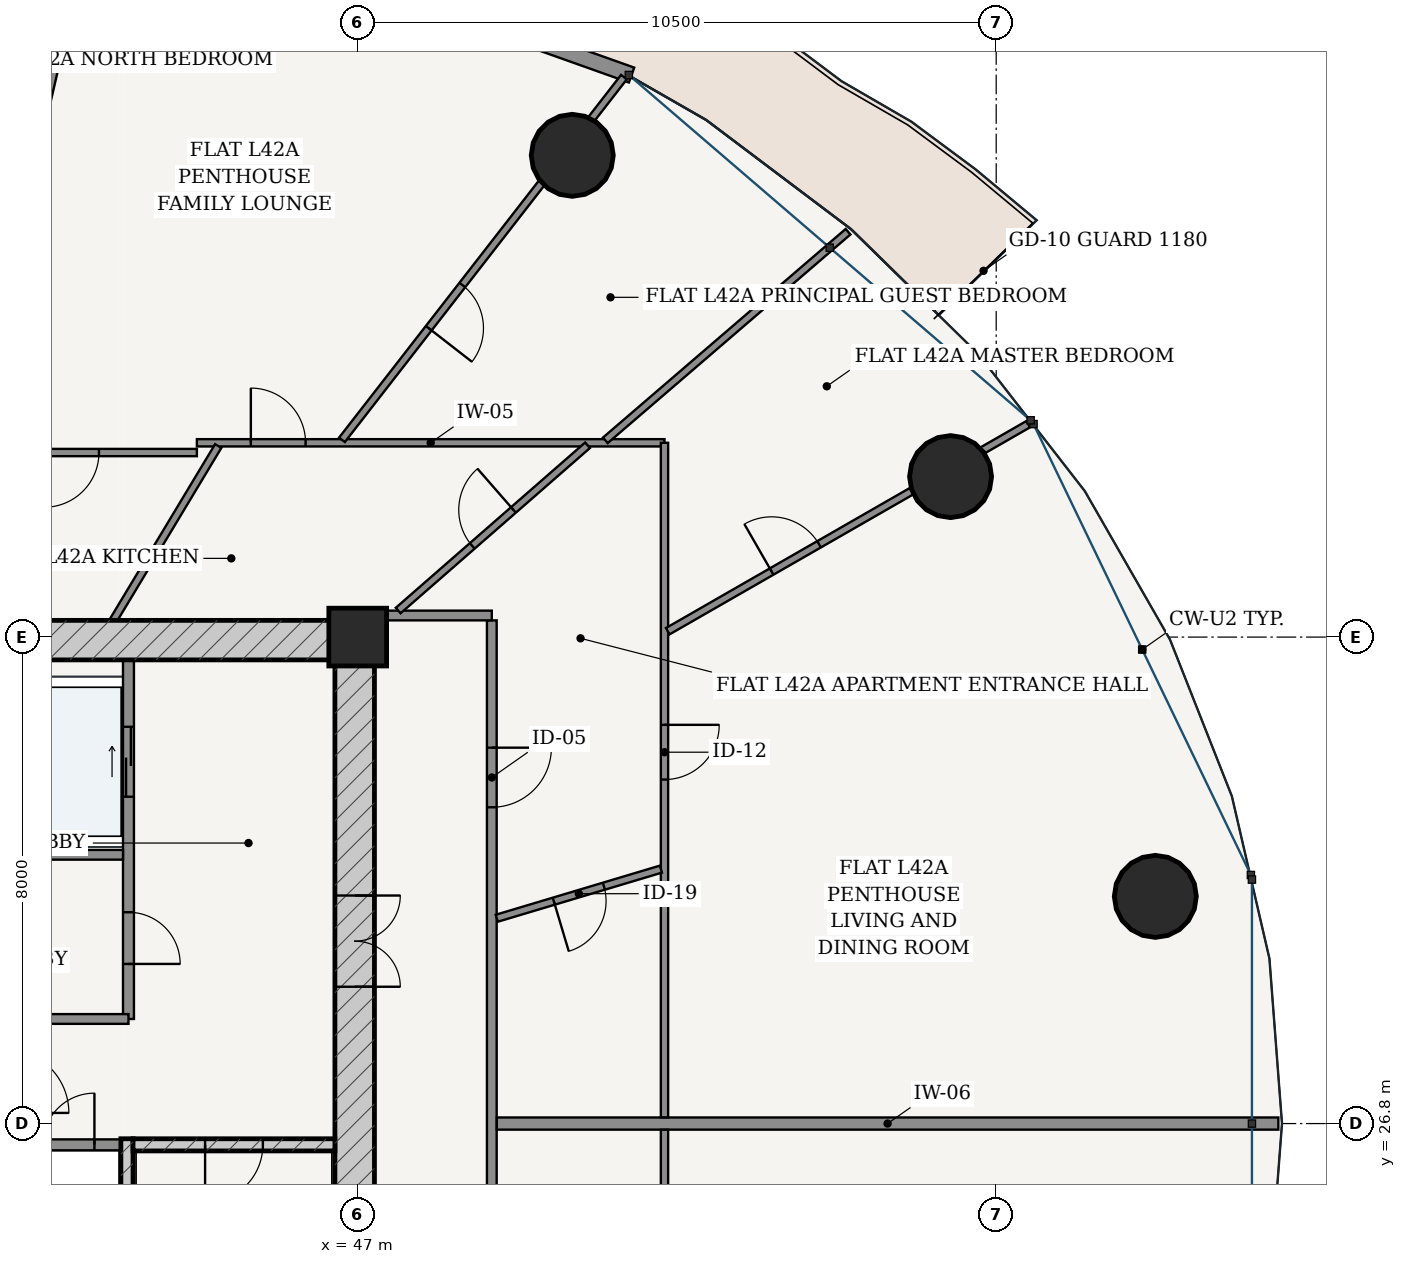
"""IFC4 building model, lengths in metres.
Left out: names, types, materials, properties, quantities, classifications, styles, units other than length and angle.
Written with IfcOpenShell. Run it as: python <this file> out.ifc"""

import sys

from ifc_helpers import new_model, si_unit, direction, frame, frame_2d, origin, origin_2d, place, context, subcontext, project, spatial, rectangle, hollow_circle, extrude, source, transform, mapped, element, fill, save


model = new_model("IFC4")
c1 = context("Model", 3, precision=1e-05, world=origin(), true_north=direction((-0.2419218956, 0.970295726276)))
c2 = subcontext(c1, "Body", "Model", "MODEL_VIEW")
j1 = project(units=[si_unit("LENGTHUNIT", "METRE"), si_unit("PLANEANGLEUNIT", "RADIAN")], contexts=[c1])
p1 = place(None, origin())
s1 = spatial("IfcSite", under=j1, at=p1, CompositionType="ELEMENT")
p2 = place(p1, origin())
s2 = spatial("IfcBuilding", under=s1, at=p2, CompositionType="ELEMENT")
p3 = place(p2, frame((0.0, 0.0, 160.6)))
s3 = spatial("IfcBuildingStorey", under=s2, at=p3, CompositionType="ELEMENT", Elevation=160.6)
p4 = place(p3, frame((47.0, 34.8, 0.0), z_axis=(0.0, 0.0, 1.0), x_axis=(1.0, 0.0, 0.0)))
e1 = element("IfcColumn", 1, at=p4, inside=s3, PredefinedType="COLUMN", context=c2, shape_type="SweptSolid", body=[
    extrude(rectangle(XDim=0.95, YDim=0.95, at=origin_2d()), origin(), (0.0, 0.0, 1.0), 3.6),
])
p5 = place(p3, frame((28.725, 34.75, 0.0), z_axis=(0.0, 0.0, 1.0), x_axis=(1.0, 0.0, 0.0)))
e2 = element("IfcWall", 2, at=p5, inside=s3, PredefinedType="SHEAR", context=c2, shape_type="SweptSolid", body=[
    extrude(rectangle(XDim=18.55, YDim=0.65, at=frame_2d((9.275, 0.0))), origin(), (0.0, 0.0, 1.0), 3.33),
])
p6 = place(p3, frame((46.95, 19.175, 0.0), z_axis=(0.0, 0.0, 1.0), x_axis=(0.0, 1.0, 0.0)))
e3 = element("IfcWall", 3, at=p6, inside=s3, PredefinedType="SHEAR", context=c2, shape_type="SweptSolid", body=[
    extrude(rectangle(XDim=15.25, YDim=0.65, at=frame_2d((7.625, 0.0))), origin(), (0.0, 0.0, 1.0), 3.33),
])
p7 = place(p6, frame((9.875, 0.0, 0.0)))
e4 = element("IfcOpeningElement", 4, at=p7, cuts=e3, PredefinedType="OPENING", context=c2, shape_type="SweptSolid", body=[
    extrude(rectangle(XDim=1.5, YDim=2.2, at=frame_2d((0.75, 1.1))), frame((0.0, 0.335, 0.0), z_axis=(0.0, -1.0, 0.0), x_axis=(1.0, 0.0, 0.0)), (0.0, 0.0, 1.0), 0.67),
])
p8 = place(p3, frame((43.205, 19.175, 0.0), z_axis=(0.0, 0.0, 1.0), x_axis=(0.0, 1.0, 0.0)))
e5 = element("IfcWall", 5, at=p8, inside=s3, PredefinedType="SOLIDWALL", context=c2, shape_type="SweptSolid", body=[
    extrude(rectangle(XDim=7.375, YDim=0.2, at=frame_2d((3.688, 0.0))), origin(), (0.0, 0.0, 1.0), 3.33),
])
p9 = place(p3, frame((43.305, 26.45, 0.0), z_axis=(0.0, 0.0, 1.0), x_axis=(1.0, 0.0, 0.0)))
e6 = element("IfcWall", 6, at=p9, inside=s3, PredefinedType="SOLIDWALL", context=c2, shape_type="SweptSolid", body=[
    extrude(rectangle(XDim=3.32, YDim=0.2, at=frame_2d((1.66, 0.0))), origin(), (0.0, 0.0, 1.0), 3.33),
])
p10 = place(p9, frame((1.185, 0.0, 0.0)))
e7 = element("IfcOpeningElement", 7, at=p10, cuts=e6, PredefinedType="OPENING", context=c2, shape_type="SweptSolid", body=[
    extrude(rectangle(XDim=0.95, YDim=2.15, at=frame_2d((0.475, 1.075))), frame((0.0, 0.11, 0.0), z_axis=(0.0, -1.0, 0.0), x_axis=(1.0, 0.0, 0.0)), (0.0, 0.0, 1.0), 0.22),
])
for number, where, z_axis, x_axis in (
    (8, (60.117, 30.536, 0.0), (0.0, 0.0, 1.0), (1.0, 0.0, 0.0)),
    (9, (56.75, 37.439, 0.0), (0.0, 0.0, 1.0), (1.0, 0.0, 0.0)),
    (10, (50.528, 42.723, 0.0), (0.0, 0.0, 1.0), (1.0, 0.0, 0.0)),
):
    element("IfcColumn", number, at=place(p3, frame(where, z_axis=z_axis, x_axis=x_axis)), inside=s3, PredefinedType="COLUMN", context=c2, shape_type="SweptSolid", body=[
        extrude(hollow_circle(Radius=0.675, WallThickness=0.042, at=origin_2d()), origin(), (0.0, 0.0, 1.0), 3.6),
    ])
p11 = place(p3, frame((51.503, 44.043, 0.0), z_axis=(0.0, 0.0, 1.0), x_axis=(-0.942095406405, 0.335344964522, 0.0)))
e11 = element("IfcWall", 11, at=p11, inside=s3, PredefinedType="SOLIDWALL", context=c2, shape_type="SweptSolid", body=[
    extrude(rectangle(XDim=9.408, YDim=0.26, at=frame_2d((4.704, 0.0))), origin(), (0.0, 0.0, 1.0), 3.33),
])
p12 = place(p11, frame((4.029, 0.0, 0.0)))
e12 = element("IfcOpeningElement", 12, at=p12, cuts=e11, PredefinedType="OPENING", context=c2, shape_type="SweptSolid", body=[
    extrude(rectangle(XDim=1.35, YDim=2.2, at=frame_2d((0.675, 1.1))), frame((0.0, 0.14, 0.0), z_axis=(0.0, -1.0, 0.0), x_axis=(1.0, 0.0, 0.0)), (0.0, 0.0, 1.0), 0.28),
])
p13 = place(p3, frame((41.39, 26.45, 0.0), z_axis=(0.0, 0.0, 1.0), x_axis=(1.0, 0.0, 0.0)))
e13 = element("IfcWall", 13, at=p13, inside=s3, PredefinedType="PARTITIONING", context=c2, shape_type="SweptSolid", body=[
    extrude(rectangle(XDim=1.71, YDim=0.18, at=frame_2d((0.855, 0.0))), origin(), (0.0, 0.0, 1.0), 3.33),
])
p14 = place(p13, frame((0.43, 0.0, 0.0)))
e14 = element("IfcOpeningElement", 14, at=p14, cuts=e13, PredefinedType="OPENING", context=c2, shape_type="SweptSolid", body=[
    extrude(rectangle(XDim=0.85, YDim=2.1, at=frame_2d((0.425, 1.05))), frame((0.0, 0.1, 0.0), z_axis=(0.0, -1.0, 0.0), x_axis=(1.0, 0.0, 0.0)), (0.0, 0.0, 1.0), 0.2),
])
p15 = place(p3, frame((43.23, 28.52, 0.0), z_axis=(0.0, 0.0, 1.0), x_axis=(0.0, 1.0, 0.0)))
e15 = element("IfcWall", 15, at=p15, inside=s3, PredefinedType="PARTITIONING", context=c2, shape_type="SweptSolid", body=[
    extrude(rectangle(XDim=5.905, YDim=0.18, at=frame_2d((2.953, 0.0))), origin(), (0.0, 0.0, 1.0), 3.33),
])
p16 = place(p15, frame((0.905, 0.0, 0.0)))
e16 = element("IfcOpeningElement", 16, at=p16, cuts=e15, PredefinedType="OPENING", context=c2, shape_type="SweptSolid", body=[
    extrude(rectangle(XDim=0.85, YDim=2.1, at=frame_2d((0.425, 1.05))), frame((0.0, 0.1, 0.0), z_axis=(0.0, -1.0, 0.0), x_axis=(1.0, 0.0, 0.0)), (0.0, 0.0, 1.0), 0.2),
])
p17 = place(p15, frame((3.655, 0.0, 0.0)))
e17 = element("IfcOpeningElement", 17, at=p17, cuts=e15, PredefinedType="OPENING", context=c2, shape_type="SweptSolid", body=[
    extrude(rectangle(XDim=1.15, YDim=2.2, at=frame_2d((0.575, 1.1))), frame((0.0, 0.1, 0.0), z_axis=(0.0, -1.0, 0.0), x_axis=(1.0, 0.0, 0.0)), (0.0, 0.0, 1.0), 0.2),
])
p18 = place(p3, frame((41.39, 31.22, 0.0), z_axis=(0.0, 0.0, 1.0), x_axis=(1.0, 0.0, 0.0)))
e18 = element("IfcWall", 18, at=p18, inside=s3, PredefinedType="PARTITIONING", context=c2, shape_type="SweptSolid", body=[
    extrude(rectangle(XDim=1.75, YDim=0.16, at=frame_2d((0.875, 0.0))), origin(), (0.0, 0.0, 1.0), 3.33),
])
p19 = place(p3, frame((41.39, 28.52, 0.0), z_axis=(0.0, 0.0, 1.0), x_axis=(1.0, 0.0, 0.0)))
e19 = element("IfcWall", 19, at=p19, inside=s3, PredefinedType="PARTITIONING", context=c2, shape_type="SweptSolid", body=[
    extrude(rectangle(XDim=1.84, YDim=0.16, at=frame_2d((0.92, 0.0))), origin(), (0.0, 0.0, 1.0), 3.33),
])
p20 = place(p3, frame((49.205, 16.675, 0.0), z_axis=(0.0, 0.0, 1.0), x_axis=(0.0, 1.0, 0.0)))
e20 = element("IfcWall", 20, at=p20, inside=s3, PredefinedType="PARTITIONING", context=c2, shape_type="SweptSolid", body=[
    extrude(rectangle(XDim=18.4, YDim=0.16, at=frame_2d((9.2, 0.0))), origin(), (0.0, 0.0, 1.0), 2.776),
])
p21 = place(p20, frame((15.326, 0.0, 0.0)))
e21 = element("IfcOpeningElement", 21, at=p21, cuts=e20, PredefinedType="OPENING", context=c2, shape_type="SweptSolid", body=[
    extrude(rectangle(XDim=0.98, YDim=2.2, at=frame_2d((0.49, 1.1))), frame((0.0, 0.09, 0.0), z_axis=(0.0, -1.0, 0.0), x_axis=(1.0, 0.0, 0.0)), (0.0, 0.0, 1.0), 0.18),
])
p22 = place(p3, frame((47.275, 35.155, 0.0), z_axis=(0.0, 0.0, 1.0), x_axis=(1.0, 0.0, 0.0)))
e22 = element("IfcWall", 22, at=p22, inside=s3, PredefinedType="PARTITIONING", context=c2, shape_type="SweptSolid", body=[
    extrude(rectangle(XDim=1.93, YDim=0.16, at=frame_2d((0.965, 0.0))), origin(), (0.0, 0.0, 1.0), 2.776),
])
p23 = place(p3, frame((49.287, 26.8, 0.0), z_axis=(0.0, 0.0, 1.0), x_axis=(1.0, 0.0, 0.0)))
e23 = element("IfcWall", 23, at=p23, inside=s3, PredefinedType="PARTITIONING", context=c2, shape_type="SweptSolid", body=[
    extrude(rectangle(XDim=12.853, YDim=0.2, at=frame_2d((6.426, 0.0))), origin(), (0.0, 0.0, 1.0), 2.846),
])
p24 = place(p3, frame((38.102, 37.835, 0.0), z_axis=(0.0, 0.0, 1.0), x_axis=(1.0, 0.0, 0.0)))
e24 = element("IfcWall", 24, at=p24, inside=s3, PredefinedType="PARTITIONING", context=c2, shape_type="SweptSolid", body=[
    extrude(rectangle(XDim=6.253, YDim=0.12, at=frame_2d((3.126, 0.0))), origin(), (0.0, 0.0, 1.0), 2.776),
])
p25 = place(p24, frame((3.742, 0.0, 0.0)))
e25 = element("IfcOpeningElement", 25, at=p25, cuts=e24, PredefinedType="OPENING", context=c2, shape_type="SweptSolid", body=[
    extrude(rectangle(XDim=0.9, YDim=2.15, at=frame_2d((0.45, 1.075))), frame((0.0, 0.07, 0.0), z_axis=(0.0, -1.0, 0.0), x_axis=(1.0, 0.0, 0.0)), (0.0, 0.0, 1.0), 0.14),
])
p26 = place(p3, frame((44.355, 37.995, 0.0), z_axis=(0.0, 0.0, 1.0), x_axis=(1.0, 0.0, 0.0)))
e26 = element("IfcWall", 26, at=p26, inside=s3, PredefinedType="PARTITIONING", context=c2, shape_type="SweptSolid", body=[
    extrude(rectangle(XDim=7.69, YDim=0.12, at=frame_2d((3.845, 0.0))), origin(), (0.0, 0.0, 1.0), 2.776),
])
p27 = place(p26, frame((0.887, 0.0, 0.0)))
e27 = element("IfcOpeningElement", 27, at=p27, cuts=e26, PredefinedType="OPENING", context=c2, shape_type="SweptSolid", body=[
    extrude(rectangle(XDim=0.9, YDim=2.15, at=frame_2d((0.45, 1.075))), frame((0.0, 0.07, 0.0), z_axis=(0.0, -1.0, 0.0), x_axis=(1.0, 0.0, 0.0)), (0.0, 0.0, 1.0), 0.14),
])
p28 = place(p3, frame((52.045, 37.995, 0.0), z_axis=(0.0, 0.0, 1.0), x_axis=(0.0, -1.0, 0.0)))
e28 = element("IfcWall", 28, at=p28, inside=s3, PredefinedType="PARTITIONING", context=c2, shape_type="SweptSolid", body=[
    extrude(rectangle(XDim=11.093, YDim=0.12, at=frame_2d((5.546, 0.0))), origin(), (0.0, 0.0, 1.0), 2.776),
])
p29 = place(p28, frame((4.638, 0.0, 0.0)))
e29 = element("IfcOpeningElement", 29, at=p29, cuts=e28, PredefinedType="OPENING", context=c2, shape_type="SweptSolid", body=[
    extrude(rectangle(XDim=0.9, YDim=2.15, at=frame_2d((0.45, 1.075))), frame((0.0, 0.07, 0.0), z_axis=(0.0, -1.0, 0.0), x_axis=(1.0, 0.0, 0.0)), (0.0, 0.0, 1.0), 0.14),
])
p30 = place(p3, frame((52.099, 34.897, 0.0), z_axis=(0.0, 0.0, 1.0), x_axis=(0.867170536447, 0.498011305813, 0.0)))
e30 = element("IfcWall", 30, at=p30, inside=s3, PredefinedType="PARTITIONING", context=c2, shape_type="SweptSolid", body=[
    extrude(rectangle(XDim=6.834, YDim=0.12, at=frame_2d((3.417, 0.0))), origin(), (0.0, 0.0, 1.0), 2.776),
])
p31 = place(p30, frame((1.969, 0.0, 0.0)))
e31 = element("IfcOpeningElement", 31, at=p31, cuts=e30, PredefinedType="OPENING", context=c2, shape_type="SweptSolid", body=[
    extrude(rectangle(XDim=0.9, YDim=2.15, at=frame_2d((0.45, 1.075))), frame((0.0, 0.07, 0.0), z_axis=(0.0, -1.0, 0.0), x_axis=(1.0, 0.0, 0.0)), (0.0, 0.0, 1.0), 0.14),
])
p32 = place(p3, frame((51.072, 38.035, 0.0), z_axis=(0.0, 0.0, 1.0), x_axis=(0.758368609512, 0.65182593697, 0.0)))
e32 = element("IfcWall", 32, at=p32, inside=s3, PredefinedType="PARTITIONING", context=c2, shape_type="SweptSolid", body=[
    extrude(rectangle(XDim=5.263, YDim=0.12, at=frame_2d((2.632, 0.0))), origin(), (0.0, 0.0, 1.0), 2.846),
])
p33 = place(p3, frame((46.741, 38.044, 0.0), z_axis=(0.0, 0.0, 1.0), x_axis=(0.613770587295, 0.789484430607, 0.0)))
e33 = element("IfcWall", 33, at=p33, inside=s3, PredefinedType="PARTITIONING", context=c2, shape_type="SweptSolid", body=[
    extrude(rectangle(XDim=7.556, YDim=0.12, at=frame_2d((3.778, 0.0))), origin(), (0.0, 0.0, 1.0), 2.776),
])
p34 = place(p33, frame((2.325, 0.0, 0.0)))
e34 = element("IfcOpeningElement", 34, at=p34, cuts=e33, PredefinedType="OPENING", context=c2, shape_type="SweptSolid", body=[
    extrude(rectangle(XDim=0.9, YDim=2.15, at=frame_2d((0.45, 1.075))), frame((0.0, 0.07, 0.0), z_axis=(0.0, -1.0, 0.0), x_axis=(1.0, 0.0, 0.0)), (0.0, 0.0, 1.0), 0.14),
])
p35 = place(p3, frame((40.568, 37.896, 0.0), z_axis=(0.0, 0.0, 1.0), x_axis=(0.225452174141, 0.974254236416, 0.0)))
e35 = element("IfcWall", 35, at=p35, inside=s3, PredefinedType="PARTITIONING", context=c2, shape_type="SweptSolid", body=[
    extrude(rectangle(XDim=9.446, YDim=0.12, at=frame_2d((4.723, 0.0))), origin(), (0.0, 0.0, 1.0), 2.776),
])
p36 = place(p35, frame((3.264, 0.0, 0.0)))
e36 = element("IfcOpeningElement", 36, at=p36, cuts=e35, PredefinedType="OPENING", context=c2, shape_type="SweptSolid", body=[
    extrude(rectangle(XDim=0.9, YDim=2.15, at=frame_2d((0.45, 1.075))), frame((0.0, 0.07, 0.0), z_axis=(0.0, -1.0, 0.0), x_axis=(1.0, 0.0, 0.0)), (0.0, 0.0, 1.0), 0.14),
])
p37 = place(p3, frame((49.287, 30.177, 0.0), z_axis=(0.0, 0.0, 1.0), x_axis=(0.958045462778, 0.28661627876, 0.0)))
e37 = element("IfcWall", 37, at=p37, inside=s3, PredefinedType="PARTITIONING", context=c2, shape_type="SweptSolid", body=[
    extrude(rectangle(XDim=2.817, YDim=0.12, at=frame_2d((1.408, 0.0))), origin(), (0.0, 0.0, 1.0), 3.33),
])
p38 = place(p37, frame((0.979, 0.0, 0.0)))
e38 = element("IfcOpeningElement", 38, at=p38, cuts=e37, PredefinedType="OPENING", context=c2, shape_type="SweptSolid", body=[
    extrude(rectangle(XDim=0.86, YDim=2.15, at=frame_2d((0.43, 1.075))), frame((0.0, 0.07, 0.0), z_axis=(0.0, -1.0, 0.0), x_axis=(1.0, 0.0, 0.0)), (0.0, 0.0, 1.0), 0.14),
])
p39 = place(p3, frame((47.665, 35.236, 0.0), z_axis=(0.0, 0.0, 1.0), x_axis=(0.753384754287, 0.657579966246, 0.0)))
e39 = element("IfcWall", 39, at=p39, inside=s3, PredefinedType="PARTITIONING", context=c2, shape_type="SweptSolid", body=[
    extrude(rectangle(XDim=4.133, YDim=0.12, at=frame_2d((2.067, 0.0))), origin(), (0.0, 0.0, 1.0), 3.005),
])
p40 = place(p39, frame((1.617, 0.0, 0.0)))
e40 = element("IfcOpeningElement", 40, at=p40, cuts=e39, PredefinedType="OPENING", context=c2, shape_type="SweptSolid", body=[
    extrude(rectangle(XDim=0.9, YDim=2.15, at=frame_2d((0.45, 1.075))), frame((0.0, 0.07, 0.0), z_axis=(0.0, -1.0, 0.0), x_axis=(1.0, 0.0, 0.0)), (0.0, 0.0, 1.0), 0.14),
])
p41 = place(p3, frame((42.98, 35.075, 0.0), z_axis=(0.0, 0.0, 1.0), x_axis=(0.515686235332, 0.856777512946, 0.0)))
e41 = element("IfcWall", 41, at=p41, inside=s3, PredefinedType="PARTITIONING", context=c2, shape_type="SweptSolid", body=[
    extrude(rectangle(XDim=3.346, YDim=0.12, at=frame_2d((1.673, 0.0))), origin(), (0.0, 0.0, 1.0), 3.33),
])
p42 = place(p3, frame((52.045, 26.698, 0.0), z_axis=(0.0, 0.0, 1.0), x_axis=(0.0, -1.0, 0.0)))
e42 = element("IfcWall", 42, at=p42, inside=s3, PredefinedType="PARTITIONING", context=c2, shape_type="SweptSolid", body=[
    extrude(rectangle(XDim=12.943, YDim=0.12, at=frame_2d((6.472, 0.0))), origin(), (0.0, 0.0, 1.0), 2.776),
])
p43 = place(p42, frame((8.503, 0.0, 0.0)))
e43 = element("IfcOpeningElement", 43, at=p43, cuts=e42, PredefinedType="OPENING", context=c2, shape_type="SweptSolid", body=[
    extrude(rectangle(XDim=0.9, YDim=2.15, at=frame_2d((0.45, 1.075))), frame((0.0, 0.07, 0.0), z_axis=(0.0, -1.0, 0.0), x_axis=(1.0, 0.0, 0.0)), (0.0, 0.0, 1.0), 0.14),
])
m1 = source(origin(), c2, "Body", "SweptSolid", [
    extrude(rectangle(XDim=1.5, YDim=2.2, at=frame_2d((0.75, 1.1))), frame((0.0, 0.025, 0.0), z_axis=(0.0, -1.0, 0.0), x_axis=(1.0, 0.0, 0.0)), (0.0, 0.0, 1.0), 0.05),
])
p44 = place(p7, frame((1.5, 0.0, 0.0), z_axis=(0.0, 0.0, 1.0), x_axis=(-1.0, 0.0, 0.0)))
e44 = element("IfcDoor", 44, at=p44, inside=s3, OperationType="DOUBLE_DOOR_SINGLE_SWING", PredefinedType="DOOR", context=c2, shape_type="MappedRepresentation", body=[
    mapped(m1, transform((0.0, 0.0, 0.0), scale=1.0)),
])
fill(e4, e44)
m2 = source(origin(), c2, "Body", "SweptSolid", [
    extrude(rectangle(XDim=0.95, YDim=2.15, at=frame_2d((0.475, 1.075))), frame((0.0, 0.025, 0.0), z_axis=(0.0, -1.0, 0.0), x_axis=(1.0, 0.0, 0.0)), (0.0, 0.0, 1.0), 0.05),
])
p45 = place(p10, frame((0.95, 0.0, 0.0), z_axis=(0.0, 0.0, 1.0), x_axis=(-1.0, 0.0, 0.0)))
e45 = element("IfcDoor", 45, at=p45, inside=s3, OperationType="SINGLE_SWING_RIGHT", PredefinedType="DOOR", context=c2, shape_type="MappedRepresentation", body=[
    mapped(m2, transform((0.0, 0.0, 0.0), scale=1.0)),
])
fill(e7, e45)
m3 = source(origin(), c2, "Body", "SweptSolid", [
    extrude(rectangle(XDim=0.85, YDim=2.1, at=frame_2d((0.425, 1.05))), frame((0.0, 0.025, 0.0), z_axis=(0.0, -1.0, 0.0), x_axis=(1.0, 0.0, 0.0)), (0.0, 0.0, 1.0), 0.05),
])
p46 = place(p14, origin())
e46 = element("IfcDoor", 46, at=p46, inside=s3, OperationType="SINGLE_SWING_RIGHT", PredefinedType="DOOR", context=c2, shape_type="MappedRepresentation", body=[
    mapped(m3, transform((0.0, 0.0, 0.0), scale=1.0)),
])
fill(e14, e46)
p47 = place(p16, frame((0.85, 0.0, 0.0), z_axis=(0.0, 0.0, 1.0), x_axis=(-1.0, 0.0, 0.0)))
e47 = element("IfcDoor", 47, at=p47, inside=s3, OperationType="SINGLE_SWING_RIGHT", PredefinedType="DOOR", context=c2, shape_type="MappedRepresentation", body=[
    mapped(m3, transform((0.0, 0.0, 0.0), scale=1.0)),
])
fill(e16, e47)
m4 = source(origin(), c2, "Body", "SweptSolid", [
    extrude(rectangle(XDim=1.15, YDim=2.2, at=frame_2d((0.575, 1.1))), frame((0.0, 0.025, 0.0), z_axis=(0.0, -1.0, 0.0), x_axis=(1.0, 0.0, 0.0)), (0.0, 0.0, 1.0), 0.05),
])
p48 = place(p17, origin())
e48 = element("IfcDoor", 48, at=p48, inside=s3, OperationType="DOUBLE_DOOR_SLIDING", PredefinedType="DOOR", context=c2, shape_type="MappedRepresentation", body=[
    mapped(m4, transform((0.0, 0.0, 0.0), scale=1.0)),
])
fill(e17, e48)
m5 = source(origin(), c2, "Body", "SweptSolid", [
    extrude(rectangle(XDim=0.98, YDim=2.2, at=frame_2d((0.49, 1.1))), frame((0.0, 0.025, 0.0), z_axis=(0.0, -1.0, 0.0), x_axis=(1.0, 0.0, 0.0)), (0.0, 0.0, 1.0), 0.05),
])
p49 = place(p21, frame((0.98, 0.0, 0.0), z_axis=(0.0, 0.0, 1.0), x_axis=(-1.0, 0.0, 0.0)))
e49 = element("IfcDoor", 49, at=p49, inside=s3, OperationType="SINGLE_SWING_LEFT", PredefinedType="DOOR", context=c2, shape_type="MappedRepresentation", body=[
    mapped(m5, transform((0.0, 0.0, 0.0), scale=1.0)),
])
fill(e21, e49)
m6 = source(origin(), c2, "Body", "SweptSolid", [
    extrude(rectangle(XDim=0.86, YDim=2.15, at=frame_2d((0.43, 1.075))), frame((0.0, 0.025, 0.0), z_axis=(0.0, -1.0, 0.0), x_axis=(1.0, 0.0, 0.0)), (0.0, 0.0, 1.0), 0.05),
])
p50 = place(p38, frame((0.86, 0.0, 0.0), z_axis=(0.0, 0.0, 1.0), x_axis=(-1.0, 0.0, 0.0)))
e50 = element("IfcDoor", 50, at=p50, inside=s3, OperationType="SINGLE_SWING_RIGHT", PredefinedType="DOOR", context=c2, shape_type="MappedRepresentation", body=[
    mapped(m6, transform((0.0, 0.0, 0.0), scale=1.0)),
])
fill(e38, e50)
m7 = source(origin(), c2, "Body", "SweptSolid", [
    extrude(rectangle(XDim=0.9, YDim=2.15, at=frame_2d((0.45, 1.075))), frame((0.0, 0.025, 0.0), z_axis=(0.0, -1.0, 0.0), x_axis=(1.0, 0.0, 0.0)), (0.0, 0.0, 1.0), 0.05),
])
p51 = place(p29, origin())
e51 = element("IfcDoor", 51, at=p51, inside=s3, OperationType="SINGLE_SWING_LEFT", PredefinedType="DOOR", context=c2, shape_type="MappedRepresentation", body=[
    mapped(m7, transform((0.0, 0.0, 0.0), scale=1.0)),
])
fill(e29, e51)
p52 = place(p40, origin())
e52 = element("IfcDoor", 52, at=p52, inside=s3, OperationType="SINGLE_SWING_RIGHT", PredefinedType="DOOR", context=c2, shape_type="MappedRepresentation", body=[
    mapped(m7, transform((0.0, 0.0, 0.0), scale=1.0)),
])
fill(e40, e52)
p53 = place(p27, origin())
e53 = element("IfcDoor", 53, at=p53, inside=s3, OperationType="SINGLE_SWING_LEFT", PredefinedType="DOOR", context=c2, shape_type="MappedRepresentation", body=[
    mapped(m7, transform((0.0, 0.0, 0.0), scale=1.0)),
])
fill(e27, e53)
p54 = place(p25, frame((0.9, 0.0, 0.0), z_axis=(0.0, 0.0, 1.0), x_axis=(-1.0, 0.0, 0.0)))
e54 = element("IfcDoor", 54, at=p54, inside=s3, OperationType="SINGLE_SWING_RIGHT", PredefinedType="DOOR", context=c2, shape_type="MappedRepresentation", body=[
    mapped(m7, transform((0.0, 0.0, 0.0), scale=1.0)),
])
fill(e25, e54)
p55 = place(p31, origin())
e55 = element("IfcDoor", 55, at=p55, inside=s3, OperationType="SINGLE_SWING_LEFT", PredefinedType="DOOR", context=c2, shape_type="MappedRepresentation", body=[
    mapped(m7, transform((0.0, 0.0, 0.0), scale=1.0)),
])
fill(e31, e55)
p56 = place(p34, frame((0.9, 0.0, 0.0), z_axis=(0.0, 0.0, 1.0), x_axis=(-1.0, 0.0, 0.0)))
e56 = element("IfcDoor", 56, at=p56, inside=s3, OperationType="SINGLE_SWING_RIGHT", PredefinedType="DOOR", context=c2, shape_type="MappedRepresentation", body=[
    mapped(m7, transform((0.0, 0.0, 0.0), scale=1.0)),
])
fill(e34, e56)
save(model, sys.argv[1])
